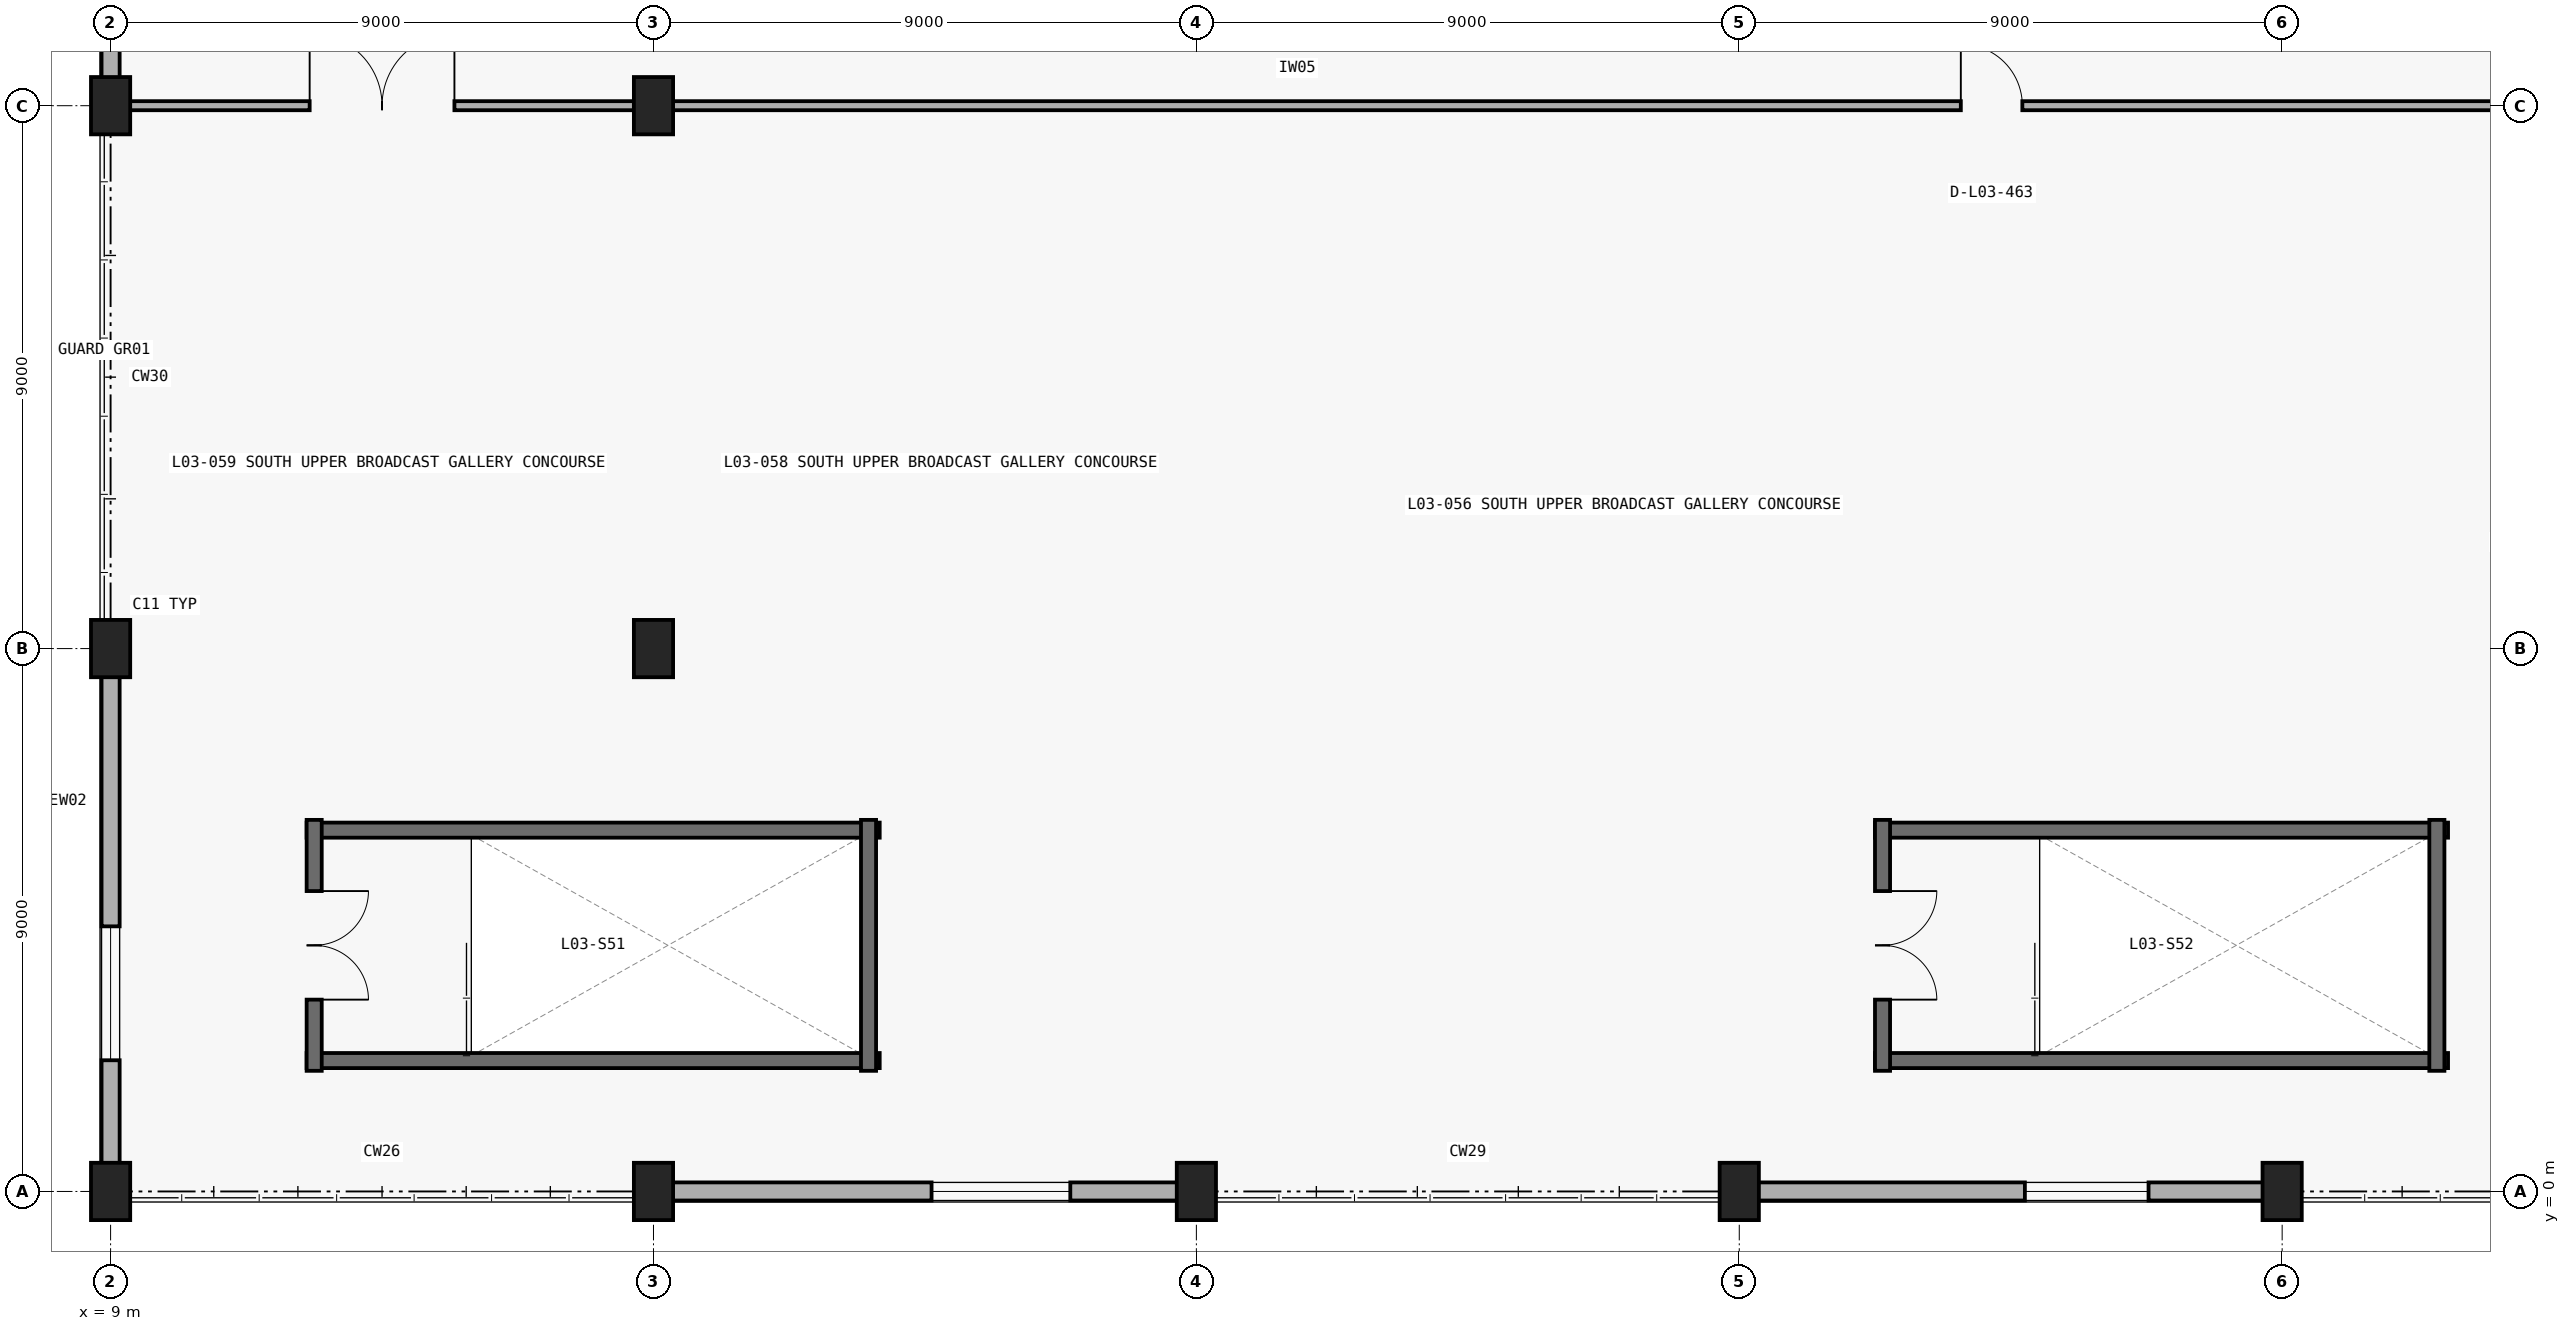
"""IFC4 building model, lengths in metres.
Left out: names, types, materials, properties, quantities, classifications, styles, units other than length and angle.
Written with IfcOpenShell. Run it as: python <this file> out.ifc"""

import sys

from ifc_helpers import new_model, si_unit, direction, frame, frame_2d, origin, origin_2d, place, context, subcontext, project, spatial, rectangle, extrude, element, fill, save


model = new_model("IFC4")
c1 = context("Model", 3, precision=1e-05, world=origin(), true_north=direction((0.0, 1.0)))
c2 = subcontext(c1, "Body", "Model", "MODEL_VIEW")
j1 = project(units=[si_unit("LENGTHUNIT", "METRE"), si_unit("PLANEANGLEUNIT", "RADIAN")], contexts=[c1])
p1 = place(None, origin())
s1 = spatial("IfcSite", under=j1, at=p1, CompositionType="ELEMENT")
p2 = place(p1, origin())
s2 = spatial("IfcBuilding", under=s1, at=p2, CompositionType="ELEMENT")
p3 = place(p2, frame((0.0, 0.0, 15.0)))
s3 = spatial("IfcBuildingStorey", under=s2, at=p3, CompositionType="ELEMENT", Elevation=15.0)
for number, where, z_axis, x_axis in (
    (1, (9.0, 0.0, 0.0), (0.0, 0.0, 1.0), (1.0, 0.0, 0.0)),
    (2, (9.0, 9.0, 0.0), (0.0, 0.0, 1.0), (1.0, 0.0, 0.0)),
    (3, (9.0, 18.0, 0.0), (0.0, 0.0, 1.0), (1.0, 0.0, 0.0)),
    (4, (18.0, 0.0, 0.0), (0.0, 0.0, 1.0), (1.0, 0.0, 0.0)),
    (5, (18.0, 9.0, 0.0), (0.0, 0.0, 1.0), (1.0, 0.0, 0.0)),
    (6, (18.0, 18.0, 0.0), (0.0, 0.0, 1.0), (1.0, 0.0, 0.0)),
    (7, (27.0, 0.0, 0.0), (0.0, 0.0, 1.0), (1.0, 0.0, 0.0)),
    (8, (36.0, 0.0, 0.0), (0.0, 0.0, 1.0), (1.0, 0.0, 0.0)),
    (9, (45.0, 0.0, 0.0), (0.0, 0.0, 1.0), (1.0, 0.0, 0.0)),
):
    element("IfcColumn", number, at=place(p3, frame(where, z_axis=z_axis, x_axis=x_axis)), inside=s3, PredefinedType="COLUMN", context=c2, shape_type="SweptSolid", body=[
        extrude(rectangle(XDim=0.65, YDim=0.95, at=origin_2d()), origin(), (0.0, 0.0, 1.0), 4.8),
    ])
p4 = place(p3, frame((44.7, 0.0, 0.0), z_axis=(0.0, 0.0, 1.0), x_axis=(-1.0, 0.0, 0.0)))
e10 = element("IfcWall", 10, at=p4, inside=s3, PredefinedType="STANDARD", context=c2, shape_type="SweptSolid", body=[
    extrude(rectangle(XDim=8.4, YDim=0.3, at=frame_2d((4.2, 0.0))), origin(), (0.0, 0.0, 1.0), 3.823),
])
p5 = place(p4, frame((1.915, 0.0, 0.95)))
e11 = element("IfcOpeningElement", 11, at=p5, cuts=e10, PredefinedType="OPENING", context=c2, shape_type="SweptSolid", body=[
    extrude(rectangle(XDim=2.05, YDim=2.2, at=frame_2d((1.025, 1.1))), frame((0.0, 0.16, 0.0), z_axis=(0.0, -1.0, 0.0), x_axis=(1.0, 0.0, 0.0)), (0.0, 0.0, 1.0), 0.32),
])
p6 = place(p3, frame((26.7, 0.0, 0.0), z_axis=(0.0, 0.0, 1.0), x_axis=(-1.0, 0.0, 0.0)))
e12 = element("IfcWall", 12, at=p6, inside=s3, PredefinedType="STANDARD", context=c2, shape_type="SweptSolid", body=[
    extrude(rectangle(XDim=8.4, YDim=0.3, at=frame_2d((4.2, 0.0))), origin(), (0.0, 0.0, 1.0), 3.823),
])
p7 = place(p6, frame((1.79, 0.0, 0.95)))
e13 = element("IfcOpeningElement", 13, at=p7, cuts=e12, PredefinedType="OPENING", context=c2, shape_type="SweptSolid", body=[
    extrude(rectangle(XDim=2.3, YDim=2.3, at=frame_2d((1.15, 1.15))), frame((0.0, 0.16, 0.0), z_axis=(0.0, -1.0, 0.0), x_axis=(1.0, 0.0, 0.0)), (0.0, 0.0, 1.0), 0.32),
])
p8 = place(p3, frame((9.0, 0.45, 0.0), z_axis=(0.0, 0.0, 1.0), x_axis=(0.0, 1.0, 0.0)))
e14 = element("IfcWall", 14, at=p8, inside=s3, PredefinedType="STANDARD", context=c2, shape_type="SweptSolid", body=[
    extrude(rectangle(XDim=8.1, YDim=0.3, at=frame_2d((4.05, 0.0))), origin(), (0.0, 0.0, 1.0), 3.857),
])
p9 = place(p8, frame((1.725, 0.0, 0.95)))
e15 = element("IfcOpeningElement", 15, at=p9, cuts=e14, PredefinedType="OPENING", context=c2, shape_type="SweptSolid", body=[
    extrude(rectangle(XDim=2.22, YDim=2.24, at=frame_2d((1.11, 1.12))), frame((0.0, 0.16, 0.0), z_axis=(0.0, -1.0, 0.0), x_axis=(1.0, 0.0, 0.0)), (0.0, 0.0, 1.0), 0.32),
])
p10 = place(p3, frame((9.0, 18.45, 0.0), z_axis=(0.0, 0.0, 1.0), x_axis=(0.0, 1.0, 0.0)))
e16 = element("IfcWall", 16, at=p10, inside=s3, PredefinedType="STANDARD", context=c2, shape_type="SweptSolid", body=[
    extrude(rectangle(XDim=8.1, YDim=0.3, at=frame_2d((4.05, 0.0))), origin(), (0.0, 0.0, 1.0), 3.857),
])
p11 = place(p10, frame((1.545, 0.0, 0.95)))
e17 = element("IfcOpeningElement", 17, at=p11, cuts=e16, PredefinedType="OPENING", context=c2, shape_type="SweptSolid", body=[
    extrude(rectangle(XDim=2.58, YDim=2.28, at=frame_2d((1.29, 1.14))), frame((0.0, 0.16, 0.0), z_axis=(0.0, -1.0, 0.0), x_axis=(1.0, 0.0, 0.0)), (0.0, 0.0, 1.0), 0.32),
])
for number, where, z_axis, x_axis in (
    (18, (12.25, 2.17, 0.0), (0.0, 0.0, 1.0), (1.0, 0.0, 0.0)),
    (19, (21.75, 5.99, 0.0), (0.0, 0.0, 1.0), (-1.0, 0.0, 0.0)),
):
    element("IfcWall", number, at=place(p3, frame(where, z_axis=z_axis, x_axis=x_axis)), inside=s3, PredefinedType="SHEAR", context=c2, shape_type="SweptSolid", body=[
        extrude(rectangle(XDim=9.5, YDim=0.25, at=frame_2d((4.75, 0.0))), origin(), (0.0, 0.0, 1.0), 4.54),
    ])
p12 = place(p3, frame((12.375, 6.16, 0.0), z_axis=(0.0, 0.0, 1.0), x_axis=(0.0, -1.0, 0.0)))
e20 = element("IfcWall", 20, at=p12, inside=s3, PredefinedType="SHEAR", context=c2, shape_type="SweptSolid", body=[
    extrude(rectangle(XDim=4.16, YDim=0.25, at=frame_2d((2.08, 0.0))), origin(), (0.0, 0.0, 1.0), 4.54),
])
p13 = place(p12, frame((1.18, 0.0, 0.0)))
e21 = element("IfcOpeningElement", 21, at=p13, cuts=e20, PredefinedType="OPENING", context=c2, shape_type="SweptSolid", body=[
    extrude(rectangle(XDim=1.8, YDim=2.25, at=frame_2d((0.9, 1.125))), frame((0.0, 0.135, 0.0), z_axis=(0.0, -1.0, 0.0), x_axis=(1.0, 0.0, 0.0)), (0.0, 0.0, 1.0), 0.27),
])
p14 = place(p3, frame((21.565, 2.0, 0.0), z_axis=(0.0, 0.0, 1.0), x_axis=(0.0, 1.0, 0.0)))
e22 = element("IfcWall", 22, at=p14, inside=s3, PredefinedType="SHEAR", context=c2, shape_type="SweptSolid", body=[
    extrude(rectangle(XDim=4.16, YDim=0.25, at=frame_2d((2.08, 0.0))), origin(), (0.0, 0.0, 1.0), 4.54),
])
for number, where, z_axis, x_axis in (
    (23, (38.25, 2.17, 0.0), (0.0, 0.0, 1.0), (1.0, 0.0, 0.0)),
    (24, (47.75, 5.99, 0.0), (0.0, 0.0, 1.0), (-1.0, 0.0, 0.0)),
):
    element("IfcWall", number, at=place(p3, frame(where, z_axis=z_axis, x_axis=x_axis)), inside=s3, PredefinedType="SHEAR", context=c2, shape_type="SweptSolid", body=[
        extrude(rectangle(XDim=9.5, YDim=0.25, at=frame_2d((4.75, 0.0))), origin(), (0.0, 0.0, 1.0), 4.54),
    ])
p15 = place(p3, frame((38.375, 6.16, 0.0), z_axis=(0.0, 0.0, 1.0), x_axis=(0.0, -1.0, 0.0)))
e25 = element("IfcWall", 25, at=p15, inside=s3, PredefinedType="SHEAR", context=c2, shape_type="SweptSolid", body=[
    extrude(rectangle(XDim=4.16, YDim=0.25, at=frame_2d((2.08, 0.0))), origin(), (0.0, 0.0, 1.0), 4.54),
])
p16 = place(p15, frame((1.18, 0.0, 0.0)))
e26 = element("IfcOpeningElement", 26, at=p16, cuts=e25, PredefinedType="OPENING", context=c2, shape_type="SweptSolid", body=[
    extrude(rectangle(XDim=1.8, YDim=2.25, at=frame_2d((0.9, 1.125))), frame((0.0, 0.135, 0.0), z_axis=(0.0, -1.0, 0.0), x_axis=(1.0, 0.0, 0.0)), (0.0, 0.0, 1.0), 0.27),
])
p17 = place(p3, frame((47.565, 2.0, 0.0), z_axis=(0.0, 0.0, 1.0), x_axis=(0.0, 1.0, 0.0)))
e27 = element("IfcWall", 27, at=p17, inside=s3, PredefinedType="SHEAR", context=c2, shape_type="SweptSolid", body=[
    extrude(rectangle(XDim=4.16, YDim=0.25, at=frame_2d((2.08, 0.0))), origin(), (0.0, 0.0, 1.0), 4.54),
])
p18 = place(p3, frame((9.31, 18.0, 0.0), z_axis=(0.0, 0.0, 1.0), x_axis=(1.0, 0.0, 0.0)))
e28 = element("IfcWall", 28, at=p18, inside=s3, PredefinedType="PARTITIONING", context=c2, shape_type="SweptSolid", body=[
    extrude(rectangle(XDim=8.38, YDim=0.15, at=frame_2d((4.19, 0.0))), origin(), (0.0, 0.0, 1.0), 3.823),
])
p19 = place(p18, frame((2.99, 0.0, 0.0)))
e29 = element("IfcOpeningElement", 29, at=p19, cuts=e28, PredefinedType="OPENING", context=c2, shape_type="SweptSolid", body=[
    extrude(rectangle(XDim=2.4, YDim=2.4, at=frame_2d((1.2, 1.2))), frame((0.0, 0.085, 0.0), z_axis=(0.0, -1.0, 0.0), x_axis=(1.0, 0.0, 0.0)), (0.0, 0.0, 1.0), 0.17),
])
p20 = place(p3, frame((17.675, 18.0, 0.0), z_axis=(0.0, 0.0, 1.0), x_axis=(1.0, 0.0, 0.0)))
e30 = element("IfcWall", 30, at=p20, inside=s3, PredefinedType="PARTITIONING", context=c2, shape_type="SweptSolid", body=[
    extrude(rectangle(XDim=45.015, YDim=0.15, at=frame_2d((22.507, 0.0))), origin(), (0.0, 0.0, 1.0), 3.823),
])
p21 = place(p20, frame((21.998, 0.0, 0.0)))
e31 = element("IfcOpeningElement", 31, at=p21, cuts=e30, PredefinedType="OPENING", context=c2, shape_type="SweptSolid", body=[
    extrude(rectangle(XDim=1.02, YDim=2.2, at=frame_2d((0.51, 1.1))), frame((0.0, 0.085, 0.0), z_axis=(0.0, -1.0, 0.0), x_axis=(1.0, 0.0, 0.0)), (0.0, 0.0, 1.0), 0.17),
])
p22 = place(p5, origin())
e32 = element("IfcWindow", 32, at=p22, inside=s3, PartitioningType="SINGLE_PANEL", PredefinedType="WINDOW", context=c2, shape_type="SweptSolid", body=[
    extrude(rectangle(XDim=2.05, YDim=2.2, at=frame_2d((1.025, 1.1))), frame((0.0, 0.03, 0.0), z_axis=(0.0, -1.0, 0.0), x_axis=(1.0, 0.0, 0.0)), (0.0, 0.0, 1.0), 0.06),
])
fill(e11, e32)
p23 = place(p7, origin())
e33 = element("IfcWindow", 33, at=p23, inside=s3, PartitioningType="SINGLE_PANEL", PredefinedType="WINDOW", context=c2, shape_type="SweptSolid", body=[
    extrude(rectangle(XDim=2.3, YDim=2.3, at=frame_2d((1.15, 1.15))), frame((0.0, 0.03, 0.0), z_axis=(0.0, -1.0, 0.0), x_axis=(1.0, 0.0, 0.0)), (0.0, 0.0, 1.0), 0.06),
])
fill(e13, e33)
p24 = place(p9, origin())
e34 = element("IfcWindow", 34, at=p24, inside=s3, PartitioningType="SINGLE_PANEL", PredefinedType="WINDOW", context=c2, shape_type="SweptSolid", body=[
    extrude(rectangle(XDim=2.22, YDim=2.24, at=frame_2d((1.11, 1.12))), frame((0.0, 0.03, 0.0), z_axis=(0.0, -1.0, 0.0), x_axis=(1.0, 0.0, 0.0)), (0.0, 0.0, 1.0), 0.06),
])
fill(e15, e34)
p25 = place(p13, origin())
e35 = element("IfcDoor", 35, at=p25, inside=s3, OperationType="DOUBLE_DOOR_SINGLE_SWING", PredefinedType="DOOR", context=c2, shape_type="SweptSolid", body=[
    extrude(rectangle(XDim=1.8, YDim=2.25, at=frame_2d((0.9, 1.125))), frame((0.0, 0.025, 0.0), z_axis=(0.0, -1.0, 0.0), x_axis=(1.0, 0.0, 0.0)), (0.0, 0.0, 1.0), 0.05),
])
fill(e21, e35)
p26 = place(p16, origin())
e36 = element("IfcDoor", 36, at=p26, inside=s3, OperationType="DOUBLE_DOOR_SINGLE_SWING", PredefinedType="DOOR", context=c2, shape_type="SweptSolid", body=[
    extrude(rectangle(XDim=1.8, YDim=2.25, at=frame_2d((0.9, 1.125))), frame((0.0, 0.025, 0.0), z_axis=(0.0, -1.0, 0.0), x_axis=(1.0, 0.0, 0.0)), (0.0, 0.0, 1.0), 0.05),
])
fill(e26, e36)
p27 = place(p19, origin())
e37 = element("IfcDoor", 37, at=p27, inside=s3, OperationType="DOUBLE_DOOR_SINGLE_SWING", PredefinedType="DOOR", context=c2, shape_type="SweptSolid", body=[
    extrude(rectangle(XDim=2.4, YDim=2.4, at=frame_2d((1.2, 1.2))), frame((0.0, 0.025, 0.0), z_axis=(0.0, -1.0, 0.0), x_axis=(1.0, 0.0, 0.0)), (0.0, 0.0, 1.0), 0.05),
])
fill(e29, e37)
p28 = place(p21, origin())
e38 = element("IfcDoor", 38, at=p28, inside=s3, OperationType="SINGLE_SWING_LEFT", PredefinedType="DOOR", context=c2, shape_type="SweptSolid", body=[
    extrude(rectangle(XDim=1.02, YDim=2.2, at=frame_2d((0.51, 1.1))), frame((0.0, 0.025, 0.0), z_axis=(0.0, -1.0, 0.0), x_axis=(1.0, 0.0, 0.0)), (0.0, 0.0, 1.0), 0.05),
])
fill(e31, e38)
save(model, sys.argv[1])
